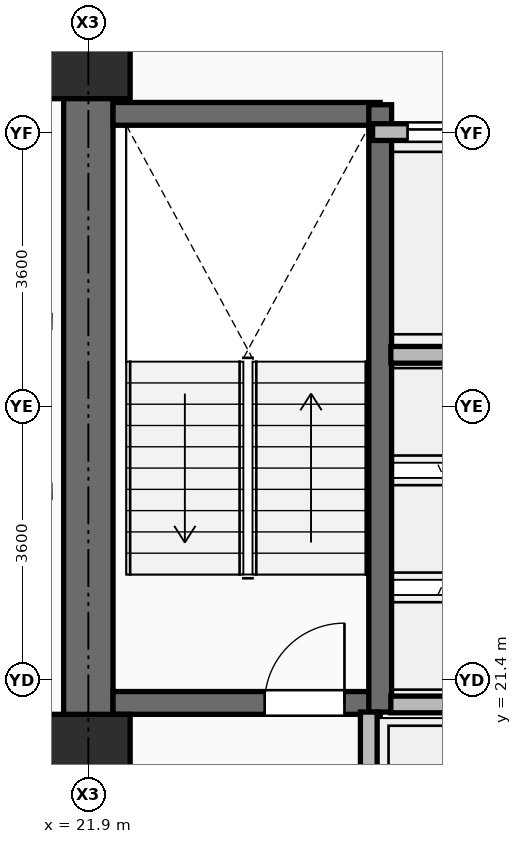
"""IFC4 building model, lengths in metres.
Left out: names, types, materials, properties, quantities, classifications, styles, units other than length and angle.
Written with IfcOpenShell. Run it as: python <this file> out.ifc"""

import sys

from ifc_helpers import new_model, si_unit, direction, frame, frame_2d, origin, origin_2d, place, context, subcontext, project, spatial, rectangle, extrude, element, fill, save


model = new_model("IFC4")
c1 = context("Model", 3, precision=1e-05, world=origin(), true_north=direction((0.0, 1.0)))
c2 = subcontext(c1, "Body", "Model", "MODEL_VIEW")
j1 = project(units=[si_unit("LENGTHUNIT", "METRE"), si_unit("PLANEANGLEUNIT", "RADIAN")], contexts=[c1])
p1 = place(None, origin())
s1 = spatial("IfcSite", under=j1, at=p1, CompositionType="ELEMENT")
p2 = place(p1, origin())
s2 = spatial("IfcBuilding", under=s1, at=p2, CompositionType="ELEMENT")
p3 = place(p2, frame((0.0, 0.0, 79.5)))
s3 = spatial("IfcBuildingStorey", under=s2, at=p3, CompositionType="ELEMENT", Elevation=79.5)
for number, where, z_axis, x_axis in (
    (1, (21.9, 20.4, 0.0), (0.0, 0.0, 1.0), (1.0, 0.0, 0.0)),
    (2, (21.9, 29.6, 0.0), (0.0, 0.0, 1.0), (1.0, 0.0, 0.0)),
):
    element("IfcColumn", number, at=place(p3, frame(where, z_axis=z_axis, x_axis=x_axis)), inside=s3, PredefinedType="COLUMN", context=c2, shape_type="SweptSolid", body=[
        extrude(rectangle(XDim=1.1, YDim=1.1, at=origin_2d()), origin(), (0.0, 0.0, 1.0), 3.75),
    ])
p4 = place(p3, frame((21.9, 18.125, 0.0), z_axis=(0.0, 0.0, 1.0), x_axis=(0.0, 1.0, 0.0)))
e3 = element("IfcWall", 3, at=p4, inside=s3, PredefinedType="SHEAR", context=c2, shape_type="SweptSolid", body=[
    extrude(rectangle(XDim=14.0, YDim=0.65, at=frame_2d((7.0, 0.0))), origin(), (0.0, 0.0, 1.0), 3.57),
])
p5 = place(p3, frame((22.225, 21.1, 0.0), z_axis=(0.0, 0.0, 1.0), x_axis=(1.0, 0.0, 0.0)))
e4 = element("IfcWall", 4, at=p5, inside=s3, PredefinedType="SHEAR", context=c2, shape_type="SweptSolid", body=[
    extrude(rectangle(XDim=3.515, YDim=0.3, at=frame_2d((1.757, 0.0))), origin(), (0.0, 0.0, 1.0), 3.57),
])
p6 = place(p5, frame((1.995, 0.0, 0.0)))
e5 = element("IfcOpeningElement", 5, at=p6, cuts=e4, PredefinedType="OPENING", context=c2, shape_type="SweptSolid", body=[
    extrude(rectangle(XDim=1.05, YDim=2.1, at=frame_2d((0.525, 1.05))), frame((0.0, 0.16, 0.0), z_axis=(0.0, -1.0, 0.0), x_axis=(1.0, 0.0, 0.0)), (0.0, 0.0, 1.0), 0.32),
])
p7 = place(p3, frame((22.225, 28.85, 0.0), z_axis=(0.0, 0.0, 1.0), x_axis=(1.0, 0.0, 0.0)))
e6 = element("IfcWall", 6, at=p7, inside=s3, PredefinedType="SHEAR", context=c2, shape_type="SweptSolid", body=[
    extrude(rectangle(XDim=3.515, YDim=0.3, at=frame_2d((1.757, 0.0))), origin(), (0.0, 0.0, 1.0), 3.57),
])
p8 = place(p3, frame((25.74, 20.98, 0.0), z_axis=(0.0, 0.0, 1.0), x_axis=(0.0, 1.0, 0.0)))
e7 = element("IfcWall", 7, at=p8, inside=s3, PredefinedType="SHEAR", context=c2, shape_type="SweptSolid", body=[
    extrude(rectangle(XDim=7.99, YDim=0.3, at=frame_2d((3.995, 0.0))), origin(), (0.0, 0.0, 1.0), 3.57),
])
p9 = place(p3, frame((25.59, 18.22, 0.0), z_axis=(0.0, 0.0, 1.0), x_axis=(0.0, 1.0, 0.0)))
e8 = element("IfcWall", 8, at=p9, inside=s3, PredefinedType="PARTITIONING", context=c2, shape_type="SweptSolid", body=[
    extrude(rectangle(XDim=2.76, YDim=0.22, at=frame_2d((1.38, 0.0))), origin(), (0.0, 0.0, 1.0), 3.55),
])
p10 = place(p9, frame((0.83, 0.0, 0.0)))
e9 = element("IfcOpeningElement", 9, at=p10, cuts=e8, PredefinedType="OPENING", context=c2, shape_type="SweptSolid", body=[
    extrude(rectangle(XDim=1.1, YDim=2.2, at=frame_2d((0.55, 1.1))), frame((0.0, 0.12, 0.0), z_axis=(0.0, -1.0, 0.0), x_axis=(1.0, 0.0, 0.0)), (0.0, 0.0, 1.0), 0.24),
])
p11 = place(p3, frame((25.64, 28.61, 0.0), z_axis=(0.0, 0.0, 1.0), x_axis=(1.0, 0.0, 0.0)))
e10 = element("IfcWall", 10, at=p11, inside=s3, PredefinedType="PARTITIONING", context=c2, shape_type="SweptSolid", body=[
    extrude(rectangle(XDim=2.02, YDim=0.22, at=frame_2d((1.01, 0.0))), origin(), (0.0, 0.0, 1.0), 3.55),
])
p12 = place(p11, frame((0.46, 0.0, 0.0)))
e11 = element("IfcOpeningElement", 11, at=p12, cuts=e10, PredefinedType="OPENING", context=c2, shape_type="SweptSolid", body=[
    extrude(rectangle(XDim=1.1, YDim=2.2, at=frame_2d((0.55, 1.1))), frame((0.0, 0.12, 0.0), z_axis=(0.0, -1.0, 0.0), x_axis=(1.0, 0.0, 0.0)), (0.0, 0.0, 1.0), 0.24),
])
for number, where, z_axis, x_axis in (
    (12, (25.88, 21.08, 0.0), (0.0, 0.0, 1.0), (1.0, 0.0, 0.0)),
    (13, (25.88, 25.68, 0.0), (0.0, 0.0, 1.0), (1.0, 0.0, 0.0)),
):
    element("IfcWall", number, at=place(p3, frame(where, z_axis=z_axis, x_axis=x_axis)), inside=s3, PredefinedType="PARTITIONING", context=c2, shape_type="SweptSolid", body=[
        extrude(rectangle(XDim=1.7, YDim=0.22, at=frame_2d((0.85, 0.0))), origin(), (0.0, 0.0, 1.0), 3.55),
    ])
p13 = place(p6, origin())
e14 = element("IfcDoor", 14, at=p13, inside=s3, OperationType="SINGLE_SWING_RIGHT", PredefinedType="DOOR", context=c2, shape_type="SweptSolid", body=[
    extrude(rectangle(XDim=1.05, YDim=2.1, at=frame_2d((0.525, 1.05))), frame((0.0, 0.025, 0.0), z_axis=(0.0, -1.0, 0.0), x_axis=(1.0, 0.0, 0.0)), (0.0, 0.0, 1.0), 0.05),
])
fill(e5, e14)
p14 = place(p12, origin())
e15 = element("IfcDoor", 15, at=p14, inside=s3, OperationType="DOUBLE_DOOR_SLIDING", PredefinedType="DOOR", context=c2, shape_type="SweptSolid", body=[
    extrude(rectangle(XDim=1.1, YDim=2.2, at=frame_2d((0.55, 1.1))), frame((0.0, 0.025, 0.0), z_axis=(0.0, -1.0, 0.0), x_axis=(1.0, 0.0, 0.0)), (0.0, 0.0, 1.0), 0.05),
])
fill(e11, e15)
save(model, sys.argv[1])
